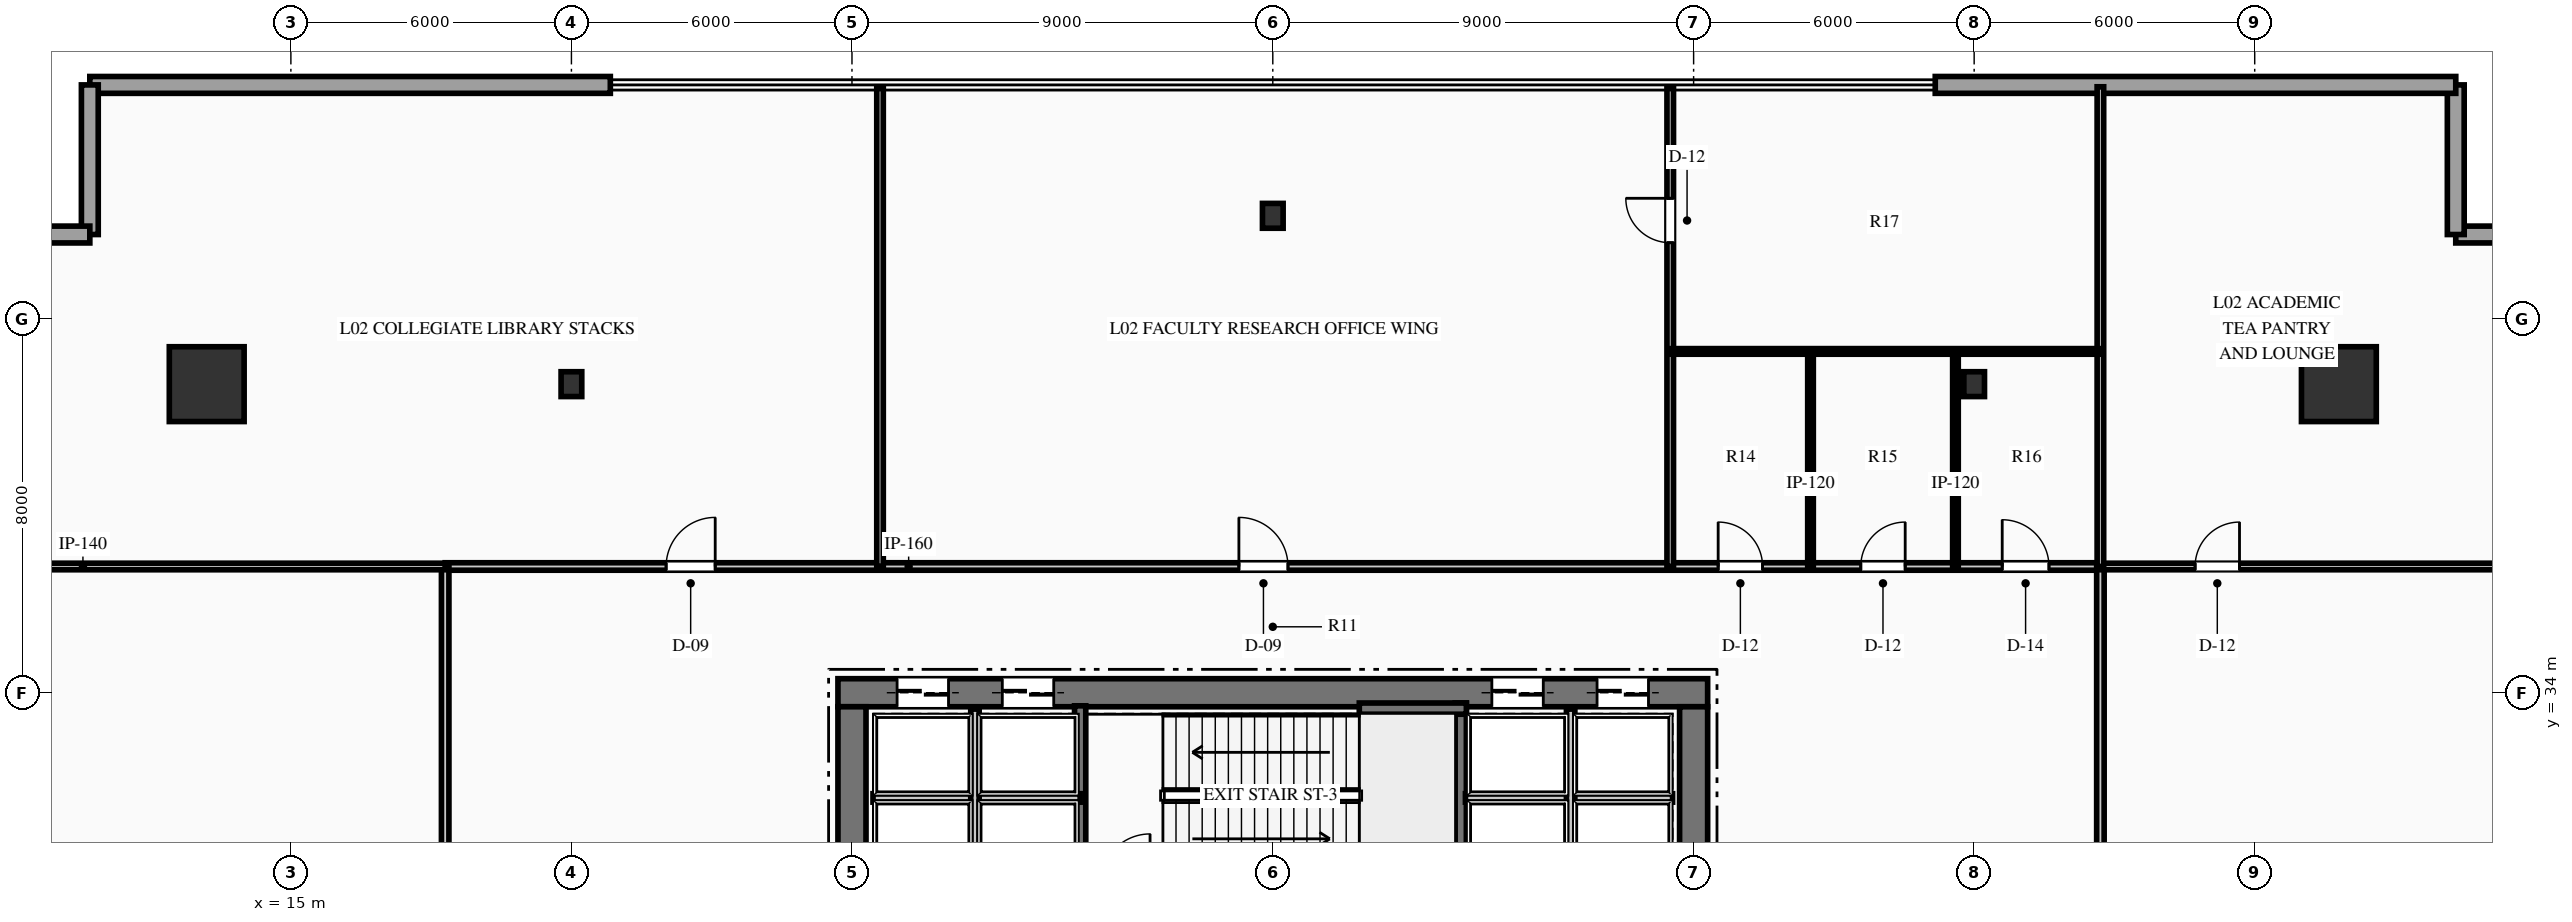
"""IFC4 building model, lengths in metres.
Left out: names, types, materials, properties, quantities, classifications, styles, units other than length and angle.
Written with IfcOpenShell. Run it as: python <this file> out.ifc"""

import sys

from ifc_helpers import new_model, si_unit, direction, frame, frame_2d, origin, origin_2d, place, context, subcontext, project, spatial, rectangle, hollow_rectangle, i_section, extrude, element, fill, save


model = new_model("IFC4")
c1 = context("Model", 3, precision=1e-05, world=origin(), true_north=direction((0.0, 1.0)))
c2 = subcontext(c1, "Body", "Model", "MODEL_VIEW")
j1 = project(units=[si_unit("LENGTHUNIT", "METRE"), si_unit("PLANEANGLEUNIT", "RADIAN")], contexts=[c1])
p1 = place(None, origin())
s1 = spatial("IfcSite", under=j1, at=p1, CompositionType="ELEMENT")
p2 = place(p1, origin())
s2 = spatial("IfcBuilding", under=s1, at=p2, CompositionType="ELEMENT")
p3 = place(p2, frame((0.0, 0.0, 11.4)))
s3 = spatial("IfcBuildingStorey", under=s2, at=p3, CompositionType="ELEMENT", Elevation=11.4)
p4 = place(p3, frame((26.7, 34.0, 0.0), z_axis=(0.0, 0.0, 1.0), x_axis=(1.0, 0.0, 0.0)))
e1 = element("IfcWall", 1, at=p4, inside=s3, PredefinedType="SHEAR", context=c2, shape_type="SweptSolid", body=[
    extrude(rectangle(XDim=18.6, YDim=0.6, at=frame_2d((9.3, 0.0))), origin(), (0.0, 0.0, 1.0), 5.4),
])
p5 = place(p4, frame((1.265, 0.0, 0.0)))
e2 = element("IfcOpeningElement", 2, at=p5, cuts=e1, PredefinedType="OPENING", context=c2, shape_type="SweptSolid", body=[
    extrude(rectangle(XDim=1.1, YDim=2.15, at=frame_2d((0.55, 1.075))), frame((0.0, 0.31, 0.0), z_axis=(0.0, -1.0, 0.0), x_axis=(1.0, 0.0, 0.0)), (0.0, 0.0, 1.0), 0.62),
])
p6 = place(p4, frame((3.515, 0.0, 0.0)))
e3 = element("IfcOpeningElement", 3, at=p6, cuts=e1, PredefinedType="OPENING", context=c2, shape_type="SweptSolid", body=[
    extrude(rectangle(XDim=1.1, YDim=2.15, at=frame_2d((0.55, 1.075))), frame((0.0, 0.31, 0.0), z_axis=(0.0, -1.0, 0.0), x_axis=(1.0, 0.0, 0.0)), (0.0, 0.0, 1.0), 0.62),
])
p7 = place(p4, frame((13.985, 0.0, 0.0)))
e4 = element("IfcOpeningElement", 4, at=p7, cuts=e1, PredefinedType="OPENING", context=c2, shape_type="SweptSolid", body=[
    extrude(rectangle(XDim=1.1, YDim=2.15, at=frame_2d((0.55, 1.075))), frame((0.0, 0.31, 0.0), z_axis=(0.0, -1.0, 0.0), x_axis=(1.0, 0.0, 0.0)), (0.0, 0.0, 1.0), 0.62),
])
p8 = place(p4, frame((16.235, 0.0, 0.0)))
e5 = element("IfcOpeningElement", 5, at=p8, cuts=e1, PredefinedType="OPENING", context=c2, shape_type="SweptSolid", body=[
    extrude(rectangle(XDim=1.1, YDim=2.15, at=frame_2d((0.55, 1.075))), frame((0.0, 0.31, 0.0), z_axis=(0.0, -1.0, 0.0), x_axis=(1.0, 0.0, 0.0)), (0.0, 0.0, 1.0), 0.62),
])
p9 = place(p3, frame((27.0, 18.3, 0.0), z_axis=(0.0, 0.0, 1.0), x_axis=(0.0, 1.0, 0.0)))
e6 = element("IfcWall", 6, at=p9, inside=s3, PredefinedType="SHEAR", context=c2, shape_type="SweptSolid", body=[
    extrude(rectangle(XDim=15.4, YDim=0.6, at=frame_2d((7.7, 0.0))), origin(), (0.0, 0.0, 1.0), 5.4),
])
p10 = place(p9, frame((9.94, 0.0, 0.0)))
e7 = element("IfcOpeningElement", 7, at=p10, cuts=e6, PredefinedType="OPENING", context=c2, shape_type="SweptSolid", body=[
    extrude(rectangle(XDim=1.4, YDim=2.2, at=frame_2d((0.7, 1.1))), frame((0.0, 0.31, 0.0), z_axis=(0.0, -1.0, 0.0), x_axis=(1.0, 0.0, 0.0)), (0.0, 0.0, 1.0), 0.62),
])
p11 = place(p3, frame((45.0, 18.3, 0.0), z_axis=(0.0, 0.0, 1.0), x_axis=(0.0, 1.0, 0.0)))
e8 = element("IfcWall", 8, at=p11, inside=s3, PredefinedType="SHEAR", context=c2, shape_type="SweptSolid", body=[
    extrude(rectangle(XDim=15.4, YDim=0.6, at=frame_2d((7.7, 0.0))), origin(), (0.0, 0.0, 1.0), 5.4),
])
p12 = place(p11, frame((9.94, 0.0, 0.0)))
e9 = element("IfcOpeningElement", 9, at=p12, cuts=e8, PredefinedType="OPENING", context=c2, shape_type="SweptSolid", body=[
    extrude(rectangle(XDim=1.4, YDim=2.2, at=frame_2d((0.7, 1.1))), frame((0.0, 0.31, 0.0), z_axis=(0.0, -1.0, 0.0), x_axis=(1.0, 0.0, 0.0)), (0.0, 0.0, 1.0), 0.62),
])
p13 = place(p3, frame((31.88, 29.93, 0.0), z_axis=(0.0, 0.0, 1.0), x_axis=(0.0, 1.0, 0.0)))
e10 = element("IfcWall", 10, at=p13, inside=s3, PredefinedType="SHEAR", context=c2, shape_type="SweptSolid", body=[
    extrude(rectangle(XDim=3.79, YDim=0.24, at=frame_2d((1.895, 0.0))), origin(), (0.0, 0.0, 1.0), 5.4),
])
p14 = place(p3, frame((40.02, 29.93, 0.0), z_axis=(0.0, 0.0, 1.0), x_axis=(0.0, 1.0, 0.0)))
e11 = element("IfcWall", 11, at=p14, inside=s3, PredefinedType="SHEAR", context=c2, shape_type="SweptSolid", body=[
    extrude(rectangle(XDim=3.85, YDim=0.24, at=frame_2d((1.925, 0.0))), origin(), (0.0, 0.0, 1.0), 5.4),
])
p15 = place(p3, frame((37.85, 33.66, 0.0), z_axis=(0.0, 0.0, 1.0), x_axis=(1.0, 0.0, 0.0)))
e12 = element("IfcWall", 12, at=p15, inside=s3, PredefinedType="SHEAR", context=c2, shape_type="SweptSolid", body=[
    extrude(rectangle(XDim=2.29, YDim=0.24, at=frame_2d((1.145, 0.0))), origin(), (0.0, 0.0, 1.0), 5.4),
])
for number, where, z_axis, x_axis in (
    (13, (58.8, 40.6, 0.0), (0.0, 0.0, 1.0), (1.0, 0.0, 0.0)),
    (14, (13.2, 40.6, 0.0), (0.0, 0.0, 1.0), (1.0, 0.0, 0.0)),
):
    element("IfcColumn", number, at=place(p3, frame(where, z_axis=z_axis, x_axis=x_axis)), inside=s3, PredefinedType="COLUMN", context=c2, shape_type="SweptSolid", body=[
        extrude(hollow_rectangle(XDim=1.6, YDim=1.6, WallThickness=0.08, at=origin_2d()), origin(), (0.0, 0.0, 1.0), 5.4),
    ])
for number, where, z_axis, x_axis in (
    (15, (21.0, 40.6, 0.0), (0.0, 0.0, 1.0), (1.0, 0.0, 0.0)),
    (16, (51.0, 40.6, 0.0), (0.0, 0.0, 1.0), (1.0, 0.0, 0.0)),
    (17, (36.0, 44.2, 0.0), (0.0, 0.0, 1.0), (1.0, 0.0, 0.0)),
):
    element("IfcColumn", number, at=place(p3, frame(where, z_axis=z_axis, x_axis=x_axis)), inside=s3, PredefinedType="COLUMN", context=c2, shape_type="SweptSolid", body=[
        extrude(i_section(OverallWidth=0.442, OverallDepth=0.531, WebThickness=0.066, FlangeThickness=0.106, at=origin_2d()), origin(), (0.0, 0.0, 1.0), 5.4),
    ])
for number, where, z_axis, x_axis in (
    (18, (61.3, 43.8, 0.0), (0.0, 0.0, 1.0), (1.0, 0.0, 0.0)),
    (19, (61.3, 47.0, 0.0), (0.0, 0.0, 1.0), (0.0, -1.0, 0.0)),
):
    element("IfcWall", number, at=place(p3, frame(where, z_axis=z_axis, x_axis=x_axis)), inside=s3, PredefinedType="STANDARD", context=c2, shape_type="SweptSolid", body=[
        extrude(rectangle(XDim=3.2, YDim=0.36, at=frame_2d((1.6, 0.0))), origin(), (0.0, 0.0, 1.0), 5.07),
    ])
for number, where, z_axis, x_axis in (
    (20, (10.7, 47.0, 0.0), (0.0, 0.0, 1.0), (1.0, 0.0, 0.0)),
    (21, (50.168, 47.0, 0.0), (0.0, 0.0, 1.0), (1.0, 0.0, 0.0)),
):
    element("IfcWall", number, at=place(p3, frame(where, z_axis=z_axis, x_axis=x_axis)), inside=s3, PredefinedType="STANDARD", context=c2, shape_type="SweptSolid", body=[
        extrude(rectangle(XDim=11.132, YDim=0.36, at=frame_2d((5.566, 0.0))), origin(), (0.0, 0.0, 1.0), 5.07),
    ])
for number, where, z_axis, x_axis in (
    (22, (10.7, 43.8, 0.0), (0.0, 0.0, 1.0), (0.0, 1.0, 0.0)),
    (23, (7.5, 43.8, 0.0), (0.0, 0.0, 1.0), (1.0, 0.0, 0.0)),
):
    element("IfcWall", number, at=place(p3, frame(where, z_axis=z_axis, x_axis=x_axis)), inside=s3, PredefinedType="STANDARD", context=c2, shape_type="SweptSolid", body=[
        extrude(rectangle(XDim=3.2, YDim=0.36, at=frame_2d((1.6, 0.0))), origin(), (0.0, 0.0, 1.0), 5.07),
    ])
p16 = place(p3, frame((27.45, 31.75, 0.0), z_axis=(0.0, 0.0, 1.0), x_axis=(1.0, 0.0, 0.0)))
e24 = element("IfcWall", 24, at=p16, inside=s3, PredefinedType="PARTITIONING", context=c2, shape_type="SweptSolid", body=[
    extrude(rectangle(XDim=4.43, YDim=0.18, at=frame_2d((2.215, 0.0))), origin(), (0.0, 0.0, 1.0), 5.07),
])
p17 = place(p3, frame((29.63, 29.9, 0.0), z_axis=(0.0, 0.0, 1.0), x_axis=(0.0, 1.0, 0.0)))
e25 = element("IfcWall", 25, at=p17, inside=s3, PredefinedType="PARTITIONING", context=c2, shape_type="SweptSolid", body=[
    extrude(rectangle(XDim=3.75, YDim=0.18, at=frame_2d((1.875, 0.0))), origin(), (0.0, 0.0, 1.0), 5.07),
])
p18 = place(p3, frame((40.12, 31.75, 0.0), z_axis=(0.0, 0.0, 1.0), x_axis=(1.0, 0.0, 0.0)))
e26 = element("IfcWall", 26, at=p18, inside=s3, PredefinedType="PARTITIONING", context=c2, shape_type="SweptSolid", body=[
    extrude(rectangle(XDim=4.43, YDim=0.18, at=frame_2d((2.215, 0.0))), origin(), (0.0, 0.0, 1.0), 5.07),
])
p19 = place(p3, frame((42.37, 29.9, 0.0), z_axis=(0.0, 0.0, 1.0), x_axis=(0.0, 1.0, 0.0)))
e27 = element("IfcWall", 27, at=p19, inside=s3, PredefinedType="PARTITIONING", context=c2, shape_type="SweptSolid", body=[
    extrude(rectangle(XDim=3.75, YDim=0.18, at=frame_2d((1.875, 0.0))), origin(), (0.0, 0.0, 1.0), 5.07),
])
p20 = place(p3, frame((18.3, 36.7, 0.0), z_axis=(0.0, 0.0, 1.0), x_axis=(1.0, 0.0, 0.0)))
e28 = element("IfcWall", 28, at=p20, inside=s3, PredefinedType="PARTITIONING", context=c2, shape_type="SweptSolid", body=[
    extrude(rectangle(XDim=35.4, YDim=0.16, at=frame_2d((17.7, 0.0))), origin(), (0.0, 0.0, 1.0), 5.07),
])
p21 = place(p20, frame((4.725, 0.0, 0.0)))
e29 = element("IfcOpeningElement", 29, at=p21, cuts=e28, PredefinedType="OPENING", context=c2, shape_type="SweptSolid", body=[
    extrude(rectangle(XDim=1.05, YDim=2.15, at=frame_2d((0.525, 1.075))), frame((0.0, 0.09, 0.0), z_axis=(0.0, -1.0, 0.0), x_axis=(1.0, 0.0, 0.0)), (0.0, 0.0, 1.0), 0.18),
])
p22 = place(p20, frame((16.975, 0.0, 0.0)))
e30 = element("IfcOpeningElement", 30, at=p22, cuts=e28, PredefinedType="OPENING", context=c2, shape_type="SweptSolid", body=[
    extrude(rectangle(XDim=1.05, YDim=2.15, at=frame_2d((0.525, 1.075))), frame((0.0, 0.09, 0.0), z_axis=(0.0, -1.0, 0.0), x_axis=(1.0, 0.0, 0.0)), (0.0, 0.0, 1.0), 0.18),
])
p23 = place(p20, frame((27.225, 0.0, 0.0)))
e31 = element("IfcOpeningElement", 31, at=p23, cuts=e28, PredefinedType="OPENING", context=c2, shape_type="SweptSolid", body=[
    extrude(rectangle(XDim=0.95, YDim=2.15, at=frame_2d((0.475, 1.075))), frame((0.0, 0.09, 0.0), z_axis=(0.0, -1.0, 0.0), x_axis=(1.0, 0.0, 0.0)), (0.0, 0.0, 1.0), 0.18),
])
p24 = place(p20, frame((30.275, 0.0, 0.0)))
e32 = element("IfcOpeningElement", 32, at=p24, cuts=e28, PredefinedType="OPENING", context=c2, shape_type="SweptSolid", body=[
    extrude(rectangle(XDim=0.95, YDim=2.15, at=frame_2d((0.475, 1.075))), frame((0.0, 0.09, 0.0), z_axis=(0.0, -1.0, 0.0), x_axis=(1.0, 0.0, 0.0)), (0.0, 0.0, 1.0), 0.18),
])
p25 = place(p20, frame((33.3, 0.0, 0.0)))
e33 = element("IfcOpeningElement", 33, at=p25, cuts=e28, PredefinedType="OPENING", context=c2, shape_type="SweptSolid", body=[
    extrude(rectangle(XDim=1.0, YDim=2.15, at=frame_2d((0.5, 1.075))), frame((0.0, 0.09, 0.0), z_axis=(0.0, -1.0, 0.0), x_axis=(1.0, 0.0, 0.0)), (0.0, 0.0, 1.0), 0.18),
])
for number, where, z_axis, x_axis in (
    (34, (18.3, 30.15, 0.0), (0.0, 0.0, 1.0), (0.0, 1.0, 0.0)),
    (35, (53.7, 30.15, 0.0), (0.0, 0.0, 1.0), (0.0, 1.0, 0.0)),
):
    element("IfcWall", number, at=place(p3, frame(where, z_axis=z_axis, x_axis=x_axis)), inside=s3, PredefinedType="PARTITIONING", context=c2, shape_type="SweptSolid", body=[
        extrude(rectangle(XDim=6.55, YDim=0.16, at=frame_2d((3.275, 0.0))), origin(), (0.0, 0.0, 1.0), 5.07),
    ])
p26 = place(p3, frame((7.54, 36.7, 0.0), z_axis=(0.0, 0.0, 1.0), x_axis=(1.0, 0.0, 0.0)))
e36 = element("IfcWall", 36, at=p26, inside=s3, PredefinedType="PARTITIONING", context=c2, shape_type="SweptSolid", body=[
    extrude(rectangle(XDim=10.76, YDim=0.14, at=frame_2d((5.38, 0.0))), origin(), (0.0, 0.0, 1.0), 5.07),
])
p27 = place(p3, frame((53.7, 36.7, 0.0), z_axis=(0.0, 0.0, 1.0), x_axis=(1.0, 0.0, 0.0)))
e37 = element("IfcWall", 37, at=p27, inside=s3, PredefinedType="PARTITIONING", context=c2, shape_type="SweptSolid", body=[
    extrude(rectangle(XDim=10.76, YDim=0.14, at=frame_2d((5.38, 0.0))), origin(), (0.0, 0.0, 1.0), 5.07),
])
p28 = place(p27, frame((2.025, 0.0, 0.0)))
e38 = element("IfcOpeningElement", 38, at=p28, cuts=e37, PredefinedType="OPENING", context=c2, shape_type="SweptSolid", body=[
    extrude(rectangle(XDim=0.95, YDim=2.15, at=frame_2d((0.475, 1.075))), frame((0.0, 0.08, 0.0), z_axis=(0.0, -1.0, 0.0), x_axis=(1.0, 0.0, 0.0)), (0.0, 0.0, 1.0), 0.16),
])
p29 = place(p3, frame((27.6, 36.7, 0.0), z_axis=(0.0, 0.0, 1.0), x_axis=(0.0, 1.0, 0.0)))
e39 = element("IfcWall", 39, at=p29, inside=s3, PredefinedType="PARTITIONING", context=c2, shape_type="SweptSolid", body=[
    extrude(rectangle(XDim=10.26, YDim=0.14, at=frame_2d((5.13, 0.0))), origin(), (0.0, 0.0, 1.0), 5.07),
])
p30 = place(p3, frame((44.5, 36.7, 0.0), z_axis=(0.0, 0.0, 1.0), x_axis=(0.0, 1.0, 0.0)))
e40 = element("IfcWall", 40, at=p30, inside=s3, PredefinedType="PARTITIONING", context=c2, shape_type="SweptSolid", body=[
    extrude(rectangle(XDim=10.26, YDim=0.14, at=frame_2d((5.13, 0.0))), origin(), (0.0, 0.0, 1.0), 5.07),
])
p31 = place(p30, frame((6.925, 0.0, 0.0)))
e41 = element("IfcOpeningElement", 41, at=p31, cuts=e40, PredefinedType="OPENING", context=c2, shape_type="SweptSolid", body=[
    extrude(rectangle(XDim=0.95, YDim=2.15, at=frame_2d((0.475, 1.075))), frame((0.0, 0.08, 0.0), z_axis=(0.0, -1.0, 0.0), x_axis=(1.0, 0.0, 0.0)), (0.0, 0.0, 1.0), 0.16),
])
p32 = place(p3, frame((53.7, 36.7, 0.0), z_axis=(0.0, 0.0, 1.0), x_axis=(0.0, 1.0, 0.0)))
e42 = element("IfcWall", 42, at=p32, inside=s3, PredefinedType="PARTITIONING", context=c2, shape_type="SweptSolid", body=[
    extrude(rectangle(XDim=10.26, YDim=0.14, at=frame_2d((5.13, 0.0))), origin(), (0.0, 0.0, 1.0), 5.07),
])
for number, where, z_axis, x_axis in (
    (43, (47.5, 36.7, 0.0), (0.0, 0.0, 1.0), (0.0, 1.0, 0.0)),
    (44, (50.6, 36.7, 0.0), (0.0, 0.0, 1.0), (0.0, 1.0, 0.0)),
):
    element("IfcWall", number, at=place(p3, frame(where, z_axis=z_axis, x_axis=x_axis)), inside=s3, PredefinedType="PARTITIONING", context=c2, shape_type="SweptSolid", body=[
        extrude(rectangle(XDim=4.6, YDim=0.12, at=frame_2d((2.3, 0.0))), origin(), (0.0, 0.0, 1.0), 5.07),
    ])
p33 = place(p3, frame((44.5, 41.3, 0.0), z_axis=(0.0, 0.0, 1.0), x_axis=(1.0, 0.0, 0.0)))
e45 = element("IfcWall", 45, at=p33, inside=s3, PredefinedType="PARTITIONING", context=c2, shape_type="SweptSolid", body=[
    extrude(rectangle(XDim=9.2, YDim=0.12, at=frame_2d((4.6, 0.0))), origin(), (0.0, 0.0, 1.0), 4.292),
])
p34 = place(p21, origin())
e46 = element("IfcDoor", 46, at=p34, inside=s3, OperationType="SINGLE_SWING_RIGHT", PredefinedType="DOOR", context=c2, shape_type="SweptSolid", body=[
    extrude(rectangle(XDim=1.05, YDim=2.15, at=frame_2d((0.525, 1.075))), frame((0.0, 0.025, 0.0), z_axis=(0.0, -1.0, 0.0), x_axis=(1.0, 0.0, 0.0)), (0.0, 0.0, 1.0), 0.05),
])
fill(e29, e46)
p35 = place(p22, origin())
e47 = element("IfcDoor", 47, at=p35, inside=s3, OperationType="SINGLE_SWING_LEFT", PredefinedType="DOOR", context=c2, shape_type="SweptSolid", body=[
    extrude(rectangle(XDim=1.05, YDim=2.15, at=frame_2d((0.525, 1.075))), frame((0.0, 0.025, 0.0), z_axis=(0.0, -1.0, 0.0), x_axis=(1.0, 0.0, 0.0)), (0.0, 0.0, 1.0), 0.05),
])
fill(e30, e47)
p36 = place(p31, origin())
e48 = element("IfcDoor", 48, at=p36, inside=s3, OperationType="SINGLE_SWING_RIGHT", PredefinedType="DOOR", context=c2, shape_type="SweptSolid", body=[
    extrude(rectangle(XDim=0.95, YDim=2.15, at=frame_2d((0.475, 1.075))), frame((0.0, 0.025, 0.0), z_axis=(0.0, -1.0, 0.0), x_axis=(1.0, 0.0, 0.0)), (0.0, 0.0, 1.0), 0.05),
])
fill(e41, e48)
p37 = place(p23, origin())
e49 = element("IfcDoor", 49, at=p37, inside=s3, OperationType="SINGLE_SWING_LEFT", PredefinedType="DOOR", context=c2, shape_type="SweptSolid", body=[
    extrude(rectangle(XDim=0.95, YDim=2.15, at=frame_2d((0.475, 1.075))), frame((0.0, 0.025, 0.0), z_axis=(0.0, -1.0, 0.0), x_axis=(1.0, 0.0, 0.0)), (0.0, 0.0, 1.0), 0.05),
])
fill(e31, e49)
p38 = place(p24, origin())
e50 = element("IfcDoor", 50, at=p38, inside=s3, OperationType="SINGLE_SWING_RIGHT", PredefinedType="DOOR", context=c2, shape_type="SweptSolid", body=[
    extrude(rectangle(XDim=0.95, YDim=2.15, at=frame_2d((0.475, 1.075))), frame((0.0, 0.025, 0.0), z_axis=(0.0, -1.0, 0.0), x_axis=(1.0, 0.0, 0.0)), (0.0, 0.0, 1.0), 0.05),
])
fill(e32, e50)
p39 = place(p25, origin())
e51 = element("IfcDoor", 51, at=p39, inside=s3, OperationType="SINGLE_SWING_LEFT", PredefinedType="DOOR", context=c2, shape_type="SweptSolid", body=[
    extrude(rectangle(XDim=1.0, YDim=2.15, at=frame_2d((0.5, 1.075))), frame((0.0, 0.025, 0.0), z_axis=(0.0, -1.0, 0.0), x_axis=(1.0, 0.0, 0.0)), (0.0, 0.0, 1.0), 0.05),
])
fill(e33, e51)
p40 = place(p28, origin())
e52 = element("IfcDoor", 52, at=p40, inside=s3, OperationType="SINGLE_SWING_RIGHT", PredefinedType="DOOR", context=c2, shape_type="SweptSolid", body=[
    extrude(rectangle(XDim=0.95, YDim=2.15, at=frame_2d((0.475, 1.075))), frame((0.0, 0.025, 0.0), z_axis=(0.0, -1.0, 0.0), x_axis=(1.0, 0.0, 0.0)), (0.0, 0.0, 1.0), 0.05),
])
fill(e38, e52)
p41 = place(p5, origin())
e53 = element("IfcDoor", 53, at=p41, inside=s3, OperationType="SLIDING_TO_LEFT", PredefinedType="DOOR", context=c2, shape_type="SweptSolid", body=[
    extrude(rectangle(XDim=1.1, YDim=2.15, at=frame_2d((0.55, 1.075))), frame((0.0, 0.025, 0.0), z_axis=(0.0, -1.0, 0.0), x_axis=(1.0, 0.0, 0.0)), (0.0, 0.0, 1.0), 0.05),
])
fill(e2, e53)
p42 = place(p6, origin())
e54 = element("IfcDoor", 54, at=p42, inside=s3, OperationType="SLIDING_TO_LEFT", PredefinedType="DOOR", context=c2, shape_type="SweptSolid", body=[
    extrude(rectangle(XDim=1.1, YDim=2.15, at=frame_2d((0.55, 1.075))), frame((0.0, 0.025, 0.0), z_axis=(0.0, -1.0, 0.0), x_axis=(1.0, 0.0, 0.0)), (0.0, 0.0, 1.0), 0.05),
])
fill(e3, e54)
p43 = place(p7, origin())
e55 = element("IfcDoor", 55, at=p43, inside=s3, OperationType="SLIDING_TO_LEFT", PredefinedType="DOOR", context=c2, shape_type="SweptSolid", body=[
    extrude(rectangle(XDim=1.1, YDim=2.15, at=frame_2d((0.55, 1.075))), frame((0.0, 0.025, 0.0), z_axis=(0.0, -1.0, 0.0), x_axis=(1.0, 0.0, 0.0)), (0.0, 0.0, 1.0), 0.05),
])
fill(e4, e55)
p44 = place(p8, origin())
e56 = element("IfcDoor", 56, at=p44, inside=s3, OperationType="SLIDING_TO_LEFT", PredefinedType="DOOR", context=c2, shape_type="SweptSolid", body=[
    extrude(rectangle(XDim=1.1, YDim=2.15, at=frame_2d((0.55, 1.075))), frame((0.0, 0.025, 0.0), z_axis=(0.0, -1.0, 0.0), x_axis=(1.0, 0.0, 0.0)), (0.0, 0.0, 1.0), 0.05),
])
fill(e5, e56)
save(model, sys.argv[1])
